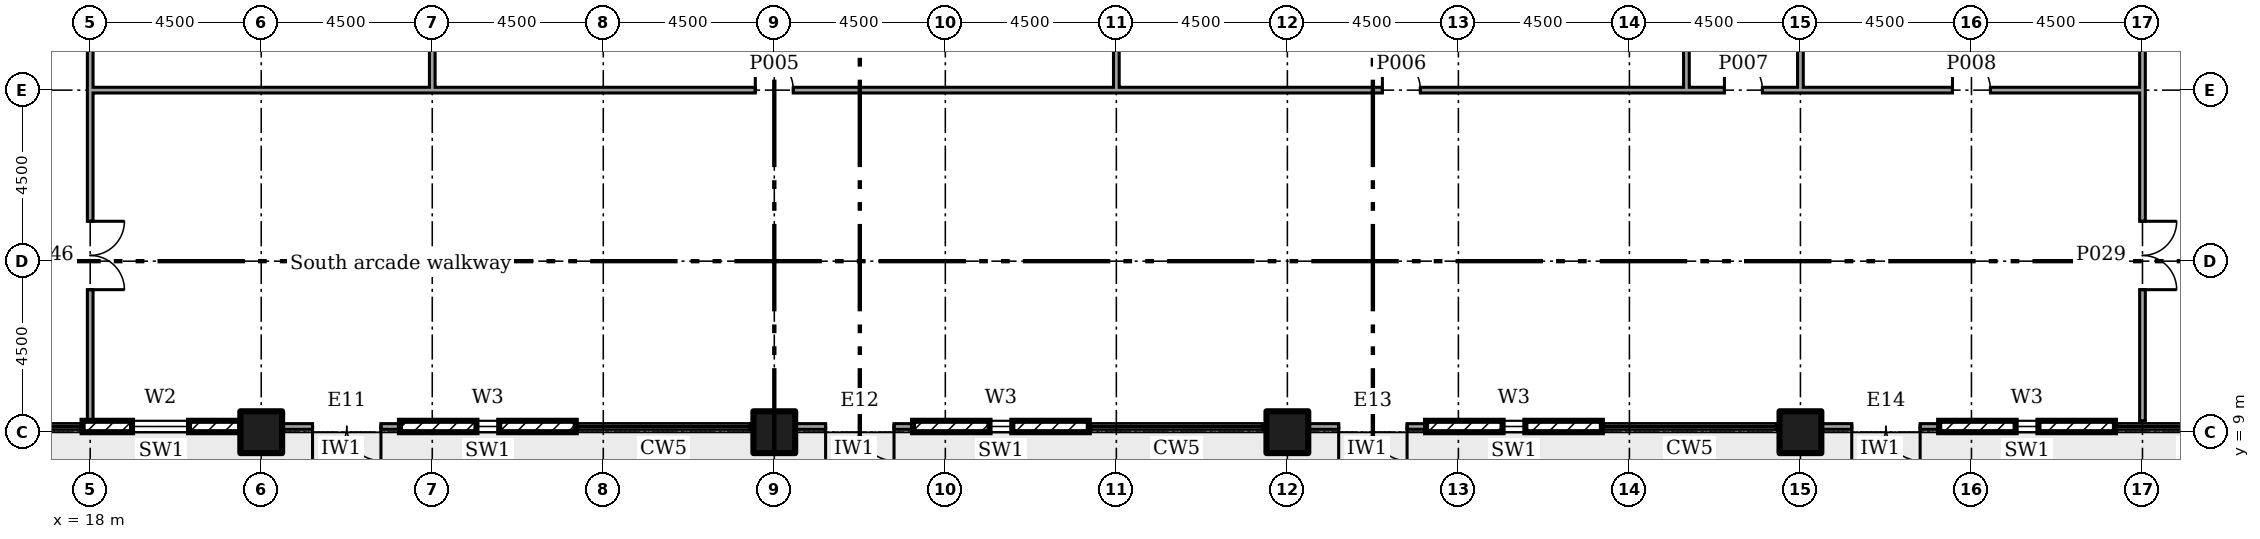
"""IFC4 building model, lengths in metres.
Left out: names, types, materials, properties, quantities, classifications, styles, units other than length and angle.
Written with IfcOpenShell. Run it as: python <this file> out.ifc"""

import sys

from ifc_helpers import new_model, si_unit, direction, frame, frame_2d, origin, origin_2d, place, context, subcontext, project, spatial, rectangle, extrude, element, fill, save


model = new_model("IFC4")
c1 = context("Model", 3, precision=1e-05, world=origin(), true_north=direction((0.0, 1.0)))
c2 = subcontext(c1, "Body", "Model", "MODEL_VIEW")
j1 = project(units=[si_unit("LENGTHUNIT", "METRE"), si_unit("PLANEANGLEUNIT", "RADIAN")], contexts=[c1])
p1 = place(None, origin())
s1 = spatial("IfcSite", under=j1, at=p1, CompositionType="ELEMENT")
p2 = place(p1, origin())
s2 = spatial("IfcBuilding", under=s1, at=p2, CompositionType="ELEMENT")
p3 = place(p2, frame((0.0, 0.0, 6.0)))
s3 = spatial("IfcBuildingStorey", under=s2, at=p3, CompositionType="ELEMENT", Elevation=6.0)
for number, where in (
    (1, (22.5, 9.0, 0.0)),
    (2, (36.0, 9.0, 0.0)),
    (3, (49.5, 9.0, 0.0)),
    (4, (63.0, 9.0, 0.0)),
):
    element("IfcColumn", number, at=place(p3, frame(where)), inside=s3, PredefinedType="COLUMN", context=c2, shape_type="SweptSolid", body=[
        extrude(rectangle(XDim=1.1, YDim=1.1, at=origin_2d()), origin(), (0.0, 0.0, 1.0), 5.5),
    ])
p4 = place(p3, frame((17.8, 9.15, 0.0)))
e5 = element("IfcWall", 5, at=p4, inside=s3, PredefinedType="ELEMENTEDWALL", context=c2, shape_type="SweptSolid", body=[
    extrude(rectangle(XDim=4.15, YDim=0.3, at=frame_2d((2.075, 0.0))), origin(), (0.0, 0.0, 1.0), 5.05),
])
p5 = place(p4, frame((1.3, 0.0, 0.9)))
e6 = element("IfcOpeningElement", 6, at=p5, cuts=e5, PredefinedType="OPENING", context=c2, shape_type="SweptSolid", body=[
    extrude(rectangle(XDim=1.5, YDim=1.8, at=frame_2d((0.75, 0.9))), frame((0.0, 0.16, 0.0), z_axis=(0.0, -1.0, 0.0), x_axis=(1.0, 0.0, 0.0)), (0.0, 0.0, 1.0), 0.32),
])
p6 = place(p3, frame((23.05, 9.15, 0.0)))
e7 = element("IfcWall", 7, at=p6, inside=s3, PredefinedType="SOLIDWALL", context=c2, shape_type="SweptSolid", body=[
    extrude(rectangle(XDim=3.1, YDim=0.15, at=frame_2d((1.55, 0.0))), origin(), (0.0, 0.0, 1.0), 5.05),
])
p7 = place(p6, frame((0.8, 0.0, 0.0)))
e8 = element("IfcOpeningElement", 8, at=p7, cuts=e7, PredefinedType="OPENING", context=c2, shape_type="SweptSolid", body=[
    extrude(rectangle(XDim=1.8, YDim=2.4, at=frame_2d((0.9, 1.2))), frame((0.0, 0.085, 0.0), z_axis=(0.0, -1.0, 0.0), x_axis=(1.0, 0.0, 0.0)), (0.0, 0.0, 1.0), 0.17),
])
p8 = place(p3, frame((26.15, 9.15, 0.0)))
e9 = element("IfcWall", 9, at=p8, inside=s3, PredefinedType="ELEMENTEDWALL", context=c2, shape_type="SweptSolid", body=[
    extrude(rectangle(XDim=4.625, YDim=0.3, at=frame_2d((2.312, 0.0))), origin(), (0.0, 0.0, 1.0), 5.05),
])
p9 = place(p8, frame((2.012, 0.0, 0.45)))
e10 = element("IfcOpeningElement", 10, at=p9, cuts=e9, PredefinedType="OPENING", context=c2, shape_type="SweptSolid", body=[
    extrude(rectangle(XDim=0.6, YDim=2.4, at=frame_2d((0.3, 1.2))), frame((0.0, 0.16, 0.0), z_axis=(0.0, -1.0, 0.0), x_axis=(1.0, 0.0, 0.0)), (0.0, 0.0, 1.0), 0.32),
])
p10 = place(p3, frame((36.55, 9.15, 0.0)))
e11 = element("IfcWall", 11, at=p10, inside=s3, PredefinedType="SOLIDWALL", context=c2, shape_type="SweptSolid", body=[
    extrude(rectangle(XDim=3.1, YDim=0.15, at=frame_2d((1.55, 0.0))), origin(), (0.0, 0.0, 1.0), 5.05),
])
p11 = place(p10, frame((0.8, 0.0, 0.0)))
e12 = element("IfcOpeningElement", 12, at=p11, cuts=e11, PredefinedType="OPENING", context=c2, shape_type="SweptSolid", body=[
    extrude(rectangle(XDim=1.8, YDim=2.4, at=frame_2d((0.9, 1.2))), frame((0.0, 0.085, 0.0), z_axis=(0.0, -1.0, 0.0), x_axis=(1.0, 0.0, 0.0)), (0.0, 0.0, 1.0), 0.17),
])
p12 = place(p3, frame((39.65, 9.15, 0.0)))
e13 = element("IfcWall", 13, at=p12, inside=s3, PredefinedType="ELEMENTEDWALL", context=c2, shape_type="SweptSolid", body=[
    extrude(rectangle(XDim=4.625, YDim=0.3, at=frame_2d((2.312, 0.0))), origin(), (0.0, 0.0, 1.0), 5.05),
])
p13 = place(p12, frame((2.012, 0.0, 0.45)))
e14 = element("IfcOpeningElement", 14, at=p13, cuts=e13, PredefinedType="OPENING", context=c2, shape_type="SweptSolid", body=[
    extrude(rectangle(XDim=0.6, YDim=2.4, at=frame_2d((0.3, 1.2))), frame((0.0, 0.16, 0.0), z_axis=(0.0, -1.0, 0.0), x_axis=(1.0, 0.0, 0.0)), (0.0, 0.0, 1.0), 0.32),
])
p14 = place(p3, frame((50.05, 9.15, 0.0)))
e15 = element("IfcWall", 15, at=p14, inside=s3, PredefinedType="SOLIDWALL", context=c2, shape_type="SweptSolid", body=[
    extrude(rectangle(XDim=3.1, YDim=0.15, at=frame_2d((1.55, 0.0))), origin(), (0.0, 0.0, 1.0), 5.05),
])
p15 = place(p14, frame((0.8, 0.0, 0.0)))
e16 = element("IfcOpeningElement", 16, at=p15, cuts=e15, PredefinedType="OPENING", context=c2, shape_type="SweptSolid", body=[
    extrude(rectangle(XDim=1.8, YDim=2.4, at=frame_2d((0.9, 1.2))), frame((0.0, 0.085, 0.0), z_axis=(0.0, -1.0, 0.0), x_axis=(1.0, 0.0, 0.0)), (0.0, 0.0, 1.0), 0.17),
])
p16 = place(p3, frame((53.15, 9.15, 0.0)))
e17 = element("IfcWall", 17, at=p16, inside=s3, PredefinedType="ELEMENTEDWALL", context=c2, shape_type="SweptSolid", body=[
    extrude(rectangle(XDim=4.625, YDim=0.3, at=frame_2d((2.312, 0.0))), origin(), (0.0, 0.0, 1.0), 5.05),
])
p17 = place(p16, frame((2.012, 0.0, 0.45)))
e18 = element("IfcOpeningElement", 18, at=p17, cuts=e17, PredefinedType="OPENING", context=c2, shape_type="SweptSolid", body=[
    extrude(rectangle(XDim=0.6, YDim=2.4, at=frame_2d((0.3, 1.2))), frame((0.0, 0.16, 0.0), z_axis=(0.0, -1.0, 0.0), x_axis=(1.0, 0.0, 0.0)), (0.0, 0.0, 1.0), 0.32),
])
p18 = place(p3, frame((63.55, 9.15, 0.0)))
e19 = element("IfcWall", 19, at=p18, inside=s3, PredefinedType="SOLIDWALL", context=c2, shape_type="SweptSolid", body=[
    extrude(rectangle(XDim=3.1, YDim=0.15, at=frame_2d((1.55, 0.0))), origin(), (0.0, 0.0, 1.0), 5.05),
])
p19 = place(p18, frame((0.8, 0.0, 0.0)))
e20 = element("IfcOpeningElement", 20, at=p19, cuts=e19, PredefinedType="OPENING", context=c2, shape_type="SweptSolid", body=[
    extrude(rectangle(XDim=1.8, YDim=2.4, at=frame_2d((0.9, 1.2))), frame((0.0, 0.085, 0.0), z_axis=(0.0, -1.0, 0.0), x_axis=(1.0, 0.0, 0.0)), (0.0, 0.0, 1.0), 0.17),
])
p20 = place(p3, frame((66.65, 9.15, 0.0)))
e21 = element("IfcWall", 21, at=p20, inside=s3, PredefinedType="ELEMENTEDWALL", context=c2, shape_type="SweptSolid", body=[
    extrude(rectangle(XDim=4.625, YDim=0.3, at=frame_2d((2.312, 0.0))), origin(), (0.0, 0.0, 1.0), 5.05),
])
p21 = place(p20, frame((2.012, 0.0, 0.45)))
e22 = element("IfcOpeningElement", 22, at=p21, cuts=e21, PredefinedType="OPENING", context=c2, shape_type="SweptSolid", body=[
    extrude(rectangle(XDim=0.6, YDim=2.4, at=frame_2d((0.3, 1.2))), frame((0.0, 0.16, 0.0), z_axis=(0.0, -1.0, 0.0), x_axis=(1.0, 0.0, 0.0)), (0.0, 0.0, 1.0), 0.32),
])
p22 = place(p3, frame((72.0, 9.3, 0.0), z_axis=(0.0, 0.0, 1.0), x_axis=(0.0, 1.0, 0.0)))
e23 = element("IfcWall", 23, at=p22, inside=s3, PredefinedType="PARTITIONING", context=c2, shape_type="SweptSolid", body=[
    extrude(rectangle(XDim=8.775, YDim=0.15, at=frame_2d((4.387, 0.0))), origin(), (0.0, 0.0, 1.0), 5.05),
])
p23 = place(p22, frame((3.45, 0.0, 0.0)))
e24 = element("IfcOpeningElement", 24, at=p23, cuts=e23, PredefinedType="OPENING", context=c2, shape_type="SweptSolid", body=[
    extrude(rectangle(XDim=1.8, YDim=2.1, at=frame_2d((0.9, 1.05))), frame((0.0, 0.085, 0.0), z_axis=(0.0, -1.0, 0.0), x_axis=(1.0, 0.0, 0.0)), (0.0, 0.0, 1.0), 0.17),
])
p24 = place(p3, frame((72.0, 18.0, 0.0), z_axis=(0.0, 0.0, 1.0), x_axis=(0.0, 1.0, 0.0)))
e25 = element("IfcWall", 25, at=p24, inside=s3, PredefinedType="PARTITIONING", context=c2, shape_type="SweptSolid", body=[
    extrude(rectangle(XDim=4.575, YDim=0.15, at=frame_2d((2.288, 0.0))), origin(), (0.0, 0.0, 1.0), 5.05),
])
p25 = place(p3, frame((18.0, 9.3, 0.0), z_axis=(0.0, 0.0, 1.0), x_axis=(0.0, 1.0, 0.0)))
e26 = element("IfcWall", 26, at=p25, inside=s3, PredefinedType="PARTITIONING", context=c2, shape_type="SweptSolid", body=[
    extrude(rectangle(XDim=8.775, YDim=0.15, at=frame_2d((4.387, 0.0))), origin(), (0.0, 0.0, 1.0), 5.05),
])
p26 = place(p25, frame((3.45, 0.0, 0.0)))
e27 = element("IfcOpeningElement", 27, at=p26, cuts=e26, PredefinedType="OPENING", context=c2, shape_type="SweptSolid", body=[
    extrude(rectangle(XDim=1.8, YDim=2.1, at=frame_2d((0.9, 1.05))), frame((0.0, 0.085, 0.0), z_axis=(0.0, -1.0, 0.0), x_axis=(1.0, 0.0, 0.0)), (0.0, 0.0, 1.0), 0.17),
])
p27 = place(p3, frame((18.0, 18.0, 0.0), z_axis=(0.0, 0.0, 1.0), x_axis=(0.0, 1.0, 0.0)))
e28 = element("IfcWall", 28, at=p27, inside=s3, PredefinedType="PARTITIONING", context=c2, shape_type="SweptSolid", body=[
    extrude(rectangle(XDim=18.075, YDim=0.15, at=frame_2d((9.038, 0.0))), origin(), (0.0, 0.0, 1.0), 5.05),
])
p28 = place(p27, frame((8.5, 0.0, 0.0)))
e29 = element("IfcOpeningElement", 29, at=p28, cuts=e28, PredefinedType="OPENING", context=c2, shape_type="SweptSolid", body=[
    extrude(rectangle(XDim=1.0, YDim=2.1, at=frame_2d((0.5, 1.05))), frame((0.0, 0.085, 0.0), z_axis=(0.0, -1.0, 0.0), x_axis=(1.0, 0.0, 0.0)), (0.0, 0.0, 1.0), 0.17),
])
p29 = place(p3, frame((18.075, 18.0, 0.0)))
e30 = element("IfcWall", 30, at=p29, inside=s3, PredefinedType="PARTITIONING", context=c2, shape_type="SweptSolid", body=[
    extrude(rectangle(XDim=9.0, YDim=0.15, at=frame_2d((4.5, 0.0))), origin(), (0.0, 0.0, 1.0), 5.05),
])
p30 = place(p3, frame((27.0, 18.0, 0.0)))
e31 = element("IfcWall", 31, at=p30, inside=s3, PredefinedType="PARTITIONING", context=c2, shape_type="SweptSolid", body=[
    extrude(rectangle(XDim=18.075, YDim=0.15, at=frame_2d((9.038, 0.0))), origin(), (0.0, 0.0, 1.0), 5.05),
])
p31 = place(p30, frame((8.5, 0.0, 0.0)))
e32 = element("IfcOpeningElement", 32, at=p31, cuts=e31, PredefinedType="OPENING", context=c2, shape_type="SweptSolid", body=[
    extrude(rectangle(XDim=1.0, YDim=2.1, at=frame_2d((0.5, 1.05))), frame((0.0, 0.085, 0.0), z_axis=(0.0, -1.0, 0.0), x_axis=(1.0, 0.0, 0.0)), (0.0, 0.0, 1.0), 0.17),
])
p32 = place(p3, frame((45.0, 18.0, 0.0)))
e33 = element("IfcWall", 33, at=p32, inside=s3, PredefinedType="PARTITIONING", context=c2, shape_type="SweptSolid", body=[
    extrude(rectangle(XDim=15.075, YDim=0.15, at=frame_2d((7.538, 0.0))), origin(), (0.0, 0.0, 1.0), 5.05),
])
p33 = place(p32, frame((7.0, 0.0, 0.0)))
e34 = element("IfcOpeningElement", 34, at=p33, cuts=e33, PredefinedType="OPENING", context=c2, shape_type="SweptSolid", body=[
    extrude(rectangle(XDim=1.0, YDim=2.1, at=frame_2d((0.5, 1.05))), frame((0.0, 0.085, 0.0), z_axis=(0.0, -1.0, 0.0), x_axis=(1.0, 0.0, 0.0)), (0.0, 0.0, 1.0), 0.17),
])
p34 = place(p3, frame((60.0, 18.0, 0.0)))
e35 = element("IfcWall", 35, at=p34, inside=s3, PredefinedType="PARTITIONING", context=c2, shape_type="SweptSolid", body=[
    extrude(rectangle(XDim=3.075, YDim=0.15, at=frame_2d((1.538, 0.0))), origin(), (0.0, 0.0, 1.0), 5.05),
])
p35 = place(p34, frame((1.0, 0.0, 0.0)))
e36 = element("IfcOpeningElement", 36, at=p35, cuts=e35, PredefinedType="OPENING", context=c2, shape_type="SweptSolid", body=[
    extrude(rectangle(XDim=1.0, YDim=2.1, at=frame_2d((0.5, 1.05))), frame((0.0, 0.085, 0.0), z_axis=(0.0, -1.0, 0.0), x_axis=(1.0, 0.0, 0.0)), (0.0, 0.0, 1.0), 0.17),
])
p36 = place(p3, frame((63.0, 18.0, 0.0)))
e37 = element("IfcWall", 37, at=p36, inside=s3, PredefinedType="PARTITIONING", context=c2, shape_type="SweptSolid", body=[
    extrude(rectangle(XDim=8.925, YDim=0.15, at=frame_2d((4.462, 0.0))), origin(), (0.0, 0.0, 1.0), 5.05),
])
p37 = place(p36, frame((4.0, 0.0, 0.0)))
e38 = element("IfcOpeningElement", 38, at=p37, cuts=e37, PredefinedType="OPENING", context=c2, shape_type="SweptSolid", body=[
    extrude(rectangle(XDim=1.0, YDim=2.1, at=frame_2d((0.5, 1.05))), frame((0.0, 0.085, 0.0), z_axis=(0.0, -1.0, 0.0), x_axis=(1.0, 0.0, 0.0)), (0.0, 0.0, 1.0), 0.17),
])
p38 = place(p3, frame((27.0, 18.075, 0.0), z_axis=(0.0, 0.0, 1.0), x_axis=(0.0, 1.0, 0.0)))
e39 = element("IfcWall", 39, at=p38, inside=s3, PredefinedType="PARTITIONING", context=c2, shape_type="SweptSolid", body=[
    extrude(rectangle(XDim=9.0, YDim=0.15, at=frame_2d((4.5, 0.0))), origin(), (0.0, 0.0, 1.0), 5.05),
])
p39 = place(p3, frame((45.0, 18.075, 0.0), z_axis=(0.0, 0.0, 1.0), x_axis=(0.0, 1.0, 0.0)))
e40 = element("IfcWall", 40, at=p39, inside=s3, PredefinedType="PARTITIONING", context=c2, shape_type="SweptSolid", body=[
    extrude(rectangle(XDim=7.625, YDim=0.15, at=frame_2d((3.812, 0.0))), origin(), (0.0, 0.0, 1.0), 5.05),
])
p40 = place(p3, frame((60.0, 18.075, 0.0), z_axis=(0.0, 0.0, 1.0), x_axis=(0.0, 1.0, 0.0)))
e41 = element("IfcWall", 41, at=p40, inside=s3, PredefinedType="PARTITIONING", context=c2, shape_type="SweptSolid", body=[
    extrude(rectangle(XDim=7.7, YDim=0.15, at=frame_2d((3.85, 0.0))), origin(), (0.0, 0.0, 1.0), 5.05),
])
p41 = place(p3, frame((63.0, 18.075, 0.0), z_axis=(0.0, 0.0, 1.0), x_axis=(0.0, 1.0, 0.0)))
e42 = element("IfcWall", 42, at=p41, inside=s3, PredefinedType="PARTITIONING", context=c2, shape_type="SweptSolid", body=[
    extrude(rectangle(XDim=3.875, YDim=0.15, at=frame_2d((1.938, 0.0))), origin(), (0.0, 0.0, 1.0), 5.05),
])
p42 = place(p5, origin())
e43 = element("IfcWindow", 43, at=p42, inside=s3, PartitioningType="SINGLE_PANEL", PredefinedType="WINDOW", context=c2, shape_type="SweptSolid", body=[
    extrude(rectangle(XDim=1.5, YDim=1.8, at=frame_2d((0.75, 0.9))), frame((0.0, 0.03, 0.0), z_axis=(0.0, -1.0, 0.0), x_axis=(1.0, 0.0, 0.0)), (0.0, 0.0, 1.0), 0.06),
])
fill(e6, e43)
p43 = place(p7, frame((1.8, 0.0, 0.0), x_axis=(-1.0, 0.0, 0.0)))
e44 = element("IfcDoor", 44, at=p43, inside=s3, OperationType="DOUBLE_DOOR_DOUBLE_SWING", PredefinedType="NOTDEFINED", context=c2, shape_type="SweptSolid", body=[
    extrude(rectangle(XDim=1.8, YDim=2.4, at=frame_2d((0.9, 1.2))), frame((0.0, 0.025, 0.0), z_axis=(0.0, -1.0, 0.0), x_axis=(1.0, 0.0, 0.0)), (0.0, 0.0, 1.0), 0.05),
])
fill(e8, e44)
p44 = place(p9, origin())
e45 = element("IfcWindow", 45, at=p44, inside=s3, PartitioningType="SINGLE_PANEL", PredefinedType="WINDOW", context=c2, shape_type="SweptSolid", body=[
    extrude(rectangle(XDim=0.6, YDim=2.4, at=frame_2d((0.3, 1.2))), frame((0.0, 0.03, 0.0), z_axis=(0.0, -1.0, 0.0), x_axis=(1.0, 0.0, 0.0)), (0.0, 0.0, 1.0), 0.06),
])
fill(e10, e45)
p45 = place(p11, frame((1.8, 0.0, 0.0), x_axis=(-1.0, 0.0, 0.0)))
e46 = element("IfcDoor", 46, at=p45, inside=s3, OperationType="DOUBLE_DOOR_DOUBLE_SWING", PredefinedType="NOTDEFINED", context=c2, shape_type="SweptSolid", body=[
    extrude(rectangle(XDim=1.8, YDim=2.4, at=frame_2d((0.9, 1.2))), frame((0.0, 0.025, 0.0), z_axis=(0.0, -1.0, 0.0), x_axis=(1.0, 0.0, 0.0)), (0.0, 0.0, 1.0), 0.05),
])
fill(e12, e46)
p46 = place(p13, origin())
e47 = element("IfcWindow", 47, at=p46, inside=s3, PartitioningType="SINGLE_PANEL", PredefinedType="WINDOW", context=c2, shape_type="SweptSolid", body=[
    extrude(rectangle(XDim=0.6, YDim=2.4, at=frame_2d((0.3, 1.2))), frame((0.0, 0.03, 0.0), z_axis=(0.0, -1.0, 0.0), x_axis=(1.0, 0.0, 0.0)), (0.0, 0.0, 1.0), 0.06),
])
fill(e14, e47)
p47 = place(p15, frame((1.8, 0.0, 0.0), x_axis=(-1.0, 0.0, 0.0)))
e48 = element("IfcDoor", 48, at=p47, inside=s3, OperationType="DOUBLE_DOOR_DOUBLE_SWING", PredefinedType="NOTDEFINED", context=c2, shape_type="SweptSolid", body=[
    extrude(rectangle(XDim=1.8, YDim=2.4, at=frame_2d((0.9, 1.2))), frame((0.0, 0.025, 0.0), z_axis=(0.0, -1.0, 0.0), x_axis=(1.0, 0.0, 0.0)), (0.0, 0.0, 1.0), 0.05),
])
fill(e16, e48)
p48 = place(p17, origin())
e49 = element("IfcWindow", 49, at=p48, inside=s3, PartitioningType="SINGLE_PANEL", PredefinedType="WINDOW", context=c2, shape_type="SweptSolid", body=[
    extrude(rectangle(XDim=0.6, YDim=2.4, at=frame_2d((0.3, 1.2))), frame((0.0, 0.03, 0.0), z_axis=(0.0, -1.0, 0.0), x_axis=(1.0, 0.0, 0.0)), (0.0, 0.0, 1.0), 0.06),
])
fill(e18, e49)
p49 = place(p19, frame((1.8, 0.0, 0.0), x_axis=(-1.0, 0.0, 0.0)))
e50 = element("IfcDoor", 50, at=p49, inside=s3, OperationType="DOUBLE_DOOR_DOUBLE_SWING", PredefinedType="NOTDEFINED", context=c2, shape_type="SweptSolid", body=[
    extrude(rectangle(XDim=1.8, YDim=2.4, at=frame_2d((0.9, 1.2))), frame((0.0, 0.025, 0.0), z_axis=(0.0, -1.0, 0.0), x_axis=(1.0, 0.0, 0.0)), (0.0, 0.0, 1.0), 0.05),
])
fill(e20, e50)
p50 = place(p21, origin())
e51 = element("IfcWindow", 51, at=p50, inside=s3, PartitioningType="SINGLE_PANEL", PredefinedType="WINDOW", context=c2, shape_type="SweptSolid", body=[
    extrude(rectangle(XDim=0.6, YDim=2.4, at=frame_2d((0.3, 1.2))), frame((0.0, 0.03, 0.0), z_axis=(0.0, -1.0, 0.0), x_axis=(1.0, 0.0, 0.0)), (0.0, 0.0, 1.0), 0.06),
])
fill(e22, e51)
p51 = place(p31, origin())
e52 = element("IfcDoor", 52, at=p51, inside=s3, OperationType="SINGLE_SWING_RIGHT", PredefinedType="DOOR", context=c2, shape_type="SweptSolid", body=[
    extrude(rectangle(XDim=1.0, YDim=2.1, at=frame_2d((0.5, 1.05))), frame((0.0, 0.025, 0.0), z_axis=(0.0, -1.0, 0.0), x_axis=(1.0, 0.0, 0.0)), (0.0, 0.0, 1.0), 0.05),
])
fill(e32, e52)
p52 = place(p33, origin())
e53 = element("IfcDoor", 53, at=p52, inside=s3, OperationType="SINGLE_SWING_RIGHT", PredefinedType="DOOR", context=c2, shape_type="SweptSolid", body=[
    extrude(rectangle(XDim=1.0, YDim=2.1, at=frame_2d((0.5, 1.05))), frame((0.0, 0.025, 0.0), z_axis=(0.0, -1.0, 0.0), x_axis=(1.0, 0.0, 0.0)), (0.0, 0.0, 1.0), 0.05),
])
fill(e34, e53)
p53 = place(p35, origin())
e54 = element("IfcDoor", 54, at=p53, inside=s3, OperationType="SINGLE_SWING_RIGHT", PredefinedType="DOOR", context=c2, shape_type="SweptSolid", body=[
    extrude(rectangle(XDim=1.0, YDim=2.1, at=frame_2d((0.5, 1.05))), frame((0.0, 0.025, 0.0), z_axis=(0.0, -1.0, 0.0), x_axis=(1.0, 0.0, 0.0)), (0.0, 0.0, 1.0), 0.05),
])
fill(e36, e54)
p54 = place(p37, origin())
e55 = element("IfcDoor", 55, at=p54, inside=s3, OperationType="SINGLE_SWING_RIGHT", PredefinedType="DOOR", context=c2, shape_type="SweptSolid", body=[
    extrude(rectangle(XDim=1.0, YDim=2.1, at=frame_2d((0.5, 1.05))), frame((0.0, 0.025, 0.0), z_axis=(0.0, -1.0, 0.0), x_axis=(1.0, 0.0, 0.0)), (0.0, 0.0, 1.0), 0.05),
])
fill(e38, e55)
p55 = place(p23, frame((1.8, 0.0, 0.0), x_axis=(-1.0, 0.0, 0.0)))
e56 = element("IfcDoor", 56, at=p55, inside=s3, OperationType="DOUBLE_DOOR_SINGLE_SWING", PredefinedType="DOOR", context=c2, shape_type="SweptSolid", body=[
    extrude(rectangle(XDim=1.8, YDim=2.1, at=frame_2d((0.9, 1.05))), frame((0.0, 0.025, 0.0), z_axis=(0.0, -1.0, 0.0), x_axis=(1.0, 0.0, 0.0)), (0.0, 0.0, 1.0), 0.05),
])
fill(e24, e56)
p56 = place(p26, frame((1.8, 0.0, 0.0), x_axis=(-1.0, 0.0, 0.0)))
e57 = element("IfcDoor", 57, at=p56, inside=s3, OperationType="DOUBLE_DOOR_SINGLE_SWING", PredefinedType="DOOR", context=c2, shape_type="SweptSolid", body=[
    extrude(rectangle(XDim=1.8, YDim=2.1, at=frame_2d((0.9, 1.05))), frame((0.0, 0.025, 0.0), z_axis=(0.0, -1.0, 0.0), x_axis=(1.0, 0.0, 0.0)), (0.0, 0.0, 1.0), 0.05),
])
fill(e27, e57)
save(model, sys.argv[1])
